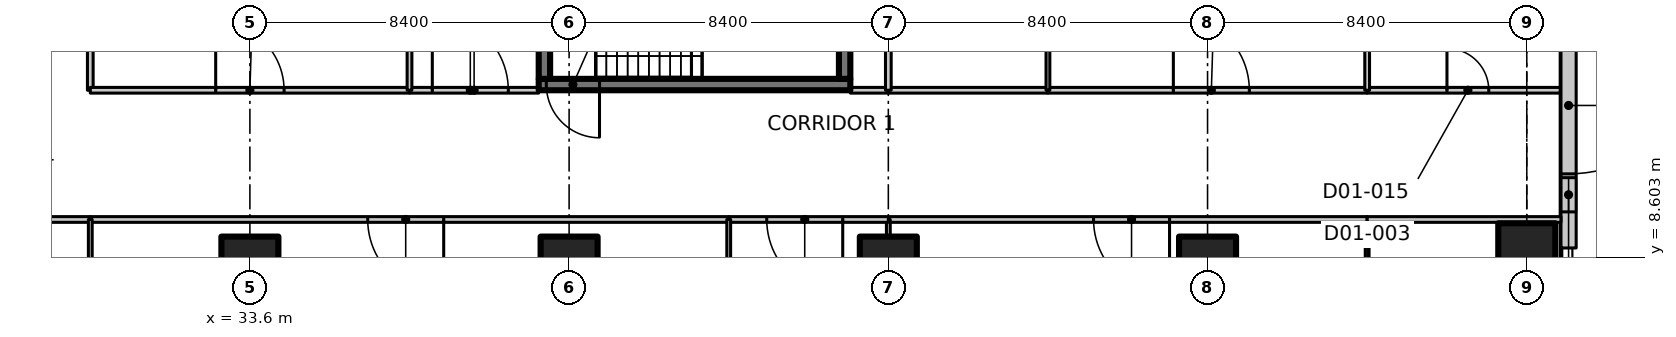
"""IFC4 building model, lengths in metres.
Left out: names, types, materials, properties, quantities, classifications, styles, units other than length and angle.
Written with IfcOpenShell. Run it as: python <this file> out.ifc"""

import sys

from ifc_helpers import new_model, si_unit, direction, frame, frame_2d, origin, origin_2d, place, context, subcontext, project, spatial, polyline, rectangle, outline, extrude, element, fill, save


model = new_model("IFC4")
c1 = context("Model", 3, precision=1e-05, world=origin(), true_north=direction((0.0, 1.0)))
c2 = subcontext(c1, "Body", "Model", "MODEL_VIEW")
j1 = project(units=[si_unit("LENGTHUNIT", "METRE"), si_unit("PLANEANGLEUNIT", "RADIAN")], contexts=[c1])
p1 = place(None, origin())
s1 = spatial("IfcSite", under=j1, at=p1, CompositionType="ELEMENT")
p2 = place(p1, origin())
s2 = spatial("IfcBuilding", under=s1, at=p2, CompositionType="ELEMENT")
p3 = place(p2, origin())
s3 = spatial("IfcBuildingStorey", under=s2, at=p3, CompositionType="ELEMENT", Elevation=0.0)
for number, where, z_axis, x_axis in (
    (1, (33.6, 8.4, 0.0), (0.0, 0.0, 1.0), (1.0, 0.0, 0.0)),
    (2, (42.0, 8.4, 0.0), (0.0, 0.0, 1.0), (1.0, 0.0, 0.0)),
    (3, (50.4, 8.4, 0.0), (0.0, 0.0, 1.0), (1.0, 0.0, 0.0)),
    (4, (58.8, 8.4, 0.0), (0.0, 0.0, 1.0), (1.0, 0.0, 0.0)),
):
    element("IfcColumn", number, at=place(p3, frame(where, z_axis=z_axis, x_axis=x_axis)), inside=s3, PredefinedType="COLUMN", context=c2, shape_type="SweptSolid", body=[
        extrude(rectangle(XDim=1.5, YDim=1.5, at=origin_2d()), origin(), (0.0, 0.0, 1.0), 6.75),
    ])
p4 = place(p3, frame((67.2, 8.4, 0.0), z_axis=(0.0, 0.0, 1.0), x_axis=(1.0, 0.0, 0.0)))
e5 = element("IfcColumn", 5, at=p4, inside=s3, PredefinedType="COLUMN", context=c2, shape_type="SweptSolid", body=[
    extrude(rectangle(XDim=1.5, YDim=2.2, at=origin_2d()), origin(), (0.0, 0.0, 1.0), 6.75),
])
p5 = place(p3, frame((68.3, 16.35, 0.0), z_axis=(0.0, 0.0, 1.0), x_axis=(0.0, -1.0, 0.0)))
e6 = element("IfcWall", 6, at=p5, inside=s3, PredefinedType="SOLIDWALL", context=c2, shape_type="SweptSolid", body=[
    extrude(rectangle(XDim=7.5, YDim=0.4, at=frame_2d((3.75, 0.0))), origin(), (0.0, 0.0, 1.0), 6.75),
])
p6 = place(p5, frame((1.95, 0.0, 0.0)))
e7 = element("IfcOpeningElement", 7, at=p6, cuts=e6, PredefinedType="OPENING", context=c2, shape_type="SweptSolid", body=[
    extrude(rectangle(XDim=3.6, YDim=2.8, at=frame_2d((1.8, 1.4))), frame((0.0, 0.21, 0.0), z_axis=(0.0, -1.0, 0.0), x_axis=(1.0, 0.0, 0.0)), (0.0, 0.0, 1.0), 0.42),
])
p7 = place(p5, frame((0.95, 0.0, 0.0)))
e8 = element("IfcOpeningElement", 8, at=p7, cuts=e6, PredefinedType="OPENING", context=c2, shape_type="SweptSolid", body=[
    extrude(rectangle(XDim=0.9, YDim=2.8, at=frame_2d((0.45, 1.4))), frame((0.0, 0.21, 0.0), z_axis=(0.0, -1.0, 0.0), x_axis=(1.0, 0.0, 0.0)), (0.0, 0.0, 1.0), 0.42),
])
p8 = place(p5, frame((5.65, 0.0, 0.0)))
e9 = element("IfcOpeningElement", 9, at=p8, cuts=e6, PredefinedType="OPENING", context=c2, shape_type="SweptSolid", body=[
    extrude(rectangle(XDim=0.9, YDim=2.8, at=frame_2d((0.45, 1.4))), frame((0.0, 0.21, 0.0), z_axis=(0.0, -1.0, 0.0), x_axis=(1.0, 0.0, 0.0)), (0.0, 0.0, 1.0), 0.42),
])
p9 = place(p3, frame((49.4, 13.15, 0.0), z_axis=(0.0, 0.0, 1.0), x_axis=(-1.0, 0.0, 0.0)))
e10 = element("IfcWall", 10, at=p9, inside=s3, PredefinedType="SHEAR", context=c2, shape_type="SweptSolid", body=[
    extrude(rectangle(XDim=8.2, YDim=0.3, at=frame_2d((4.1, 0.0))), origin(), (0.0, 0.0, 1.0), 6.75),
])
p10 = place(p9, frame((6.6, 0.0, 0.0)))
e11 = element("IfcOpeningElement", 11, at=p10, cuts=e10, PredefinedType="OPENING", context=c2, shape_type="SweptSolid", body=[
    extrude(rectangle(XDim=1.4, YDim=2.1, at=frame_2d((0.7, 1.05))), frame((0.0, 0.16, 0.0), z_axis=(0.0, -1.0, 0.0), x_axis=(1.0, 0.0, 0.0)), (0.0, 0.0, 1.0), 0.32),
])
for number, where, z_axis, x_axis in (
    (12, (41.35, 13.3, 0.0), (0.0, 0.0, 1.0), (0.0, 1.0, 0.0)),
    (13, (49.25, 13.3, 0.0), (0.0, 0.0, 1.0), (0.0, 1.0, 0.0)),
):
    element("IfcWall", number, at=place(p3, frame(where, z_axis=z_axis, x_axis=x_axis)), inside=s3, PredefinedType="SHEAR", context=c2, shape_type="SweptSolid", body=[
        extrude(rectangle(XDim=2.55, YDim=0.3, at=frame_2d((1.275, 0.0))), origin(), (0.0, 0.0, 1.0), 6.75),
    ])
p11 = place(p3, frame((29.4, 9.6, 0.0), z_axis=(0.0, 0.0, 1.0), x_axis=(-1.0, 0.0, 0.0)))
e14 = element("IfcWall", 14, at=p11, inside=s3, PredefinedType="PARTITIONING", context=c2, shape_type="SweptSolid", body=[
    extrude(rectangle(XDim=4.2, YDim=0.15, at=frame_2d((2.1, 0.0))), origin(), (0.0, 0.0, 1.0), 6.73),
])
p12 = place(p11, frame((1.5, 0.0, 0.0)))
e15 = element("IfcOpeningElement", 15, at=p12, cuts=e14, PredefinedType="OPENING", context=c2, shape_type="SweptSolid", body=[
    extrude(rectangle(XDim=1.1, YDim=2.1, at=frame_2d((0.55, 1.05))), frame((0.0, 0.085, 0.0), z_axis=(0.0, -1.0, 0.0), x_axis=(1.0, 0.0, 0.0)), (0.0, 0.0, 1.0), 0.17),
])
p13 = place(p3, frame((29.4, 21.2, 0.0), z_axis=(0.0, 0.0, 1.0), x_axis=(0.0, -1.0, 0.0)))
e16 = element("IfcWall", 16, at=p13, inside=s3, PredefinedType="PARTITIONING", context=c2, shape_type="SweptSolid", body=[
    extrude(rectangle(XDim=8.2, YDim=0.15, at=frame_2d((4.1, 0.0))), origin(), (0.0, 0.0, 1.0), 6.73),
])
p14 = place(p3, frame((63.0, 9.6, 0.0), z_axis=(0.0, 0.0, 1.0), x_axis=(0.0, -1.0, 0.0)))
e17 = element("IfcWall", 17, at=p14, inside=s3, PredefinedType="PARTITIONING", context=c2, shape_type="SweptSolid", body=[
    extrude(outline(polyline([(0.0, 0.0), (5.4, 0.0), (5.4, 6.38), (4.736, 6.38), (4.734, 6.73), (0.0, 6.73), (0.0, 0.0)])), frame((0.0, 0.05, 0.0), z_axis=(0.0, -1.0, 0.0), x_axis=(1.0, 0.0, 0.0)), (0.0, 0.0, 1.0), 0.1),
])
p15 = place(p14, frame((2.1, 0.0, 0.0)))
e18 = element("IfcOpeningElement", 18, at=p15, cuts=e17, PredefinedType="OPENING", context=c2, shape_type="SweptSolid", body=[
    extrude(rectangle(XDim=1.0, YDim=2.1, at=frame_2d((0.5, 1.05))), frame((0.0, 0.06, 0.0), z_axis=(0.0, -1.0, 0.0), x_axis=(1.0, 0.0, 0.0)), (0.0, 0.0, 1.0), 0.12),
])
p16 = place(p3, frame((63.0, 9.6, 0.0), z_axis=(0.0, 0.0, 1.0), x_axis=(-1.0, 0.0, 0.0)))
e19 = element("IfcWall", 19, at=p16, inside=s3, PredefinedType="PARTITIONING", context=c2, shape_type="SweptSolid", body=[
    extrude(rectangle(XDim=12.6, YDim=0.15, at=frame_2d((6.3, 0.0))), origin(), (0.0, 0.0, 1.0), 6.73),
])
p17 = place(p16, frame((5.2, 0.0, 0.0)))
e20 = element("IfcOpeningElement", 20, at=p17, cuts=e19, PredefinedType="OPENING", context=c2, shape_type="SweptSolid", body=[
    extrude(rectangle(XDim=2.0, YDim=2.4, at=frame_2d((1.0, 1.2))), frame((0.0, 0.085, 0.0), z_axis=(0.0, -1.0, 0.0), x_axis=(1.0, 0.0, 0.0)), (0.0, 0.0, 1.0), 0.17),
])
p18 = place(p3, frame((50.4, 9.17, 0.0), z_axis=(0.0, 0.0, 1.0), x_axis=(0.0, 1.0, 0.0)))
e21 = element("IfcWall", 21, at=p18, inside=s3, PredefinedType="PARTITIONING", context=c2, shape_type="SweptSolid", body=[
    extrude(rectangle(XDim=0.43, YDim=0.1, at=frame_2d((0.215, 0.0))), origin(), (0.0, 0.0, 1.0), 6.73),
])
p19 = place(p3, frame((63.0, 9.6, 0.0), z_axis=(0.0, 0.0, 1.0), x_axis=(1.0, 0.0, 0.0)))
e22 = element("IfcWall", 22, at=p19, inside=s3, PredefinedType="PARTITIONING", context=c2, shape_type="SweptSolid", body=[
    extrude(outline(polyline([(0.0, 0.0), (5.1, 0.0), (5.1, 6.73), (4.65, 6.73), (4.648, 6.38), (3.752, 6.38), (3.75, 6.73), (0.0, 6.73), (0.0, 0.0)])), frame((0.0, 0.075, 0.0), z_axis=(0.0, -1.0, 0.0), x_axis=(1.0, 0.0, 0.0)), (0.0, 0.0, 1.0), 0.15),
])
p20 = place(p3, frame((46.2, 9.6, 0.0), z_axis=(0.0, 0.0, 1.0), x_axis=(-1.0, 0.0, 0.0)))
e23 = element("IfcWall", 23, at=p20, inside=s3, PredefinedType="PARTITIONING", context=c2, shape_type="SweptSolid", body=[
    extrude(rectangle(XDim=16.8, YDim=0.15, at=frame_2d((8.4, 0.0))), origin(), (0.0, 0.0, 1.0), 6.73),
])
p21 = place(p20, frame((7.5, 0.0, 0.0)))
e24 = element("IfcOpeningElement", 24, at=p21, cuts=e23, PredefinedType="OPENING", context=c2, shape_type="SweptSolid", body=[
    extrude(rectangle(XDim=2.0, YDim=2.4, at=frame_2d((1.0, 1.2))), frame((0.0, 0.085, 0.0), z_axis=(0.0, -1.0, 0.0), x_axis=(1.0, 0.0, 0.0)), (0.0, 0.0, 1.0), 0.17),
])
p22 = place(p3, frame((50.4, 9.6, 0.0), z_axis=(0.0, 0.0, 1.0), x_axis=(-1.0, 0.0, 0.0)))
e25 = element("IfcWall", 25, at=p22, inside=s3, PredefinedType="PARTITIONING", context=c2, shape_type="SweptSolid", body=[
    extrude(rectangle(XDim=4.2, YDim=0.15, at=frame_2d((2.1, 0.0))), origin(), (0.0, 0.0, 1.0), 6.73),
])
p23 = place(p22, frame((1.2, 0.0, 0.0)))
e26 = element("IfcOpeningElement", 26, at=p23, cuts=e25, PredefinedType="OPENING", context=c2, shape_type="SweptSolid", body=[
    extrude(rectangle(XDim=2.0, YDim=2.4, at=frame_2d((1.0, 1.2))), frame((0.0, 0.085, 0.0), z_axis=(0.0, -1.0, 0.0), x_axis=(1.0, 0.0, 0.0)), (0.0, 0.0, 1.0), 0.17),
])
p24 = place(p3, frame((29.4, 13.0, 0.0), z_axis=(0.0, 0.0, 1.0), x_axis=(1.0, 0.0, 0.0)))
e27 = element("IfcWall", 27, at=p24, inside=s3, PredefinedType="PARTITIONING", context=c2, shape_type="SweptSolid", body=[
    extrude(rectangle(XDim=8.4, YDim=0.15, at=frame_2d((4.2, 0.0))), origin(), (0.0, 0.0, 1.0), 6.73),
])
p25 = place(p24, frame((3.3, 0.0, 0.0)))
e28 = element("IfcOpeningElement", 28, at=p25, cuts=e27, PredefinedType="OPENING", context=c2, shape_type="SweptSolid", body=[
    extrude(rectangle(XDim=1.8, YDim=2.1, at=frame_2d((0.9, 1.05))), frame((0.0, 0.085, 0.0), z_axis=(0.0, -1.0, 0.0), x_axis=(1.0, 0.0, 0.0)), (0.0, 0.0, 1.0), 0.17),
])
p26 = place(p3, frame((37.8, 13.0, 0.0), z_axis=(0.0, 0.0, 1.0), x_axis=(1.0, 0.0, 0.0)))
e29 = element("IfcWall", 29, at=p26, inside=s3, PredefinedType="PARTITIONING", context=c2, shape_type="SweptSolid", body=[
    extrude(rectangle(XDim=3.4, YDim=0.15, at=frame_2d((1.7, 0.0))), origin(), (0.0, 0.0, 1.0), 6.73),
])
p27 = place(p26, frame((0.6, 0.0, 0.0)))
e30 = element("IfcOpeningElement", 30, at=p27, cuts=e29, PredefinedType="OPENING", context=c2, shape_type="SweptSolid", body=[
    extrude(rectangle(XDim=2.0, YDim=2.4, at=frame_2d((1.0, 1.2))), frame((0.0, 0.085, 0.0), z_axis=(0.0, -1.0, 0.0), x_axis=(1.0, 0.0, 0.0)), (0.0, 0.0, 1.0), 0.17),
])
p28 = place(p3, frame((49.4, 13.0, 0.0), z_axis=(0.0, 0.0, 1.0), x_axis=(1.0, 0.0, 0.0)))
e31 = element("IfcWall", 31, at=p28, inside=s3, PredefinedType="PARTITIONING", context=c2, shape_type="SweptSolid", body=[
    extrude(rectangle(XDim=1.0, YDim=0.15, at=frame_2d((0.5, 0.0))), origin(), (0.0, 0.0, 1.0), 6.73),
])
p29 = place(p3, frame((54.6, 13.0, 0.0), z_axis=(0.0, 0.0, 1.0), x_axis=(1.0, 0.0, 0.0)))
e32 = element("IfcWall", 32, at=p29, inside=s3, PredefinedType="PARTITIONING", context=c2, shape_type="SweptSolid", body=[
    extrude(rectangle(XDim=8.4, YDim=0.15, at=frame_2d((4.2, 0.0))), origin(), (0.0, 0.0, 1.0), 6.73),
])
p30 = place(p29, frame((3.3, 0.0, 0.0)))
e33 = element("IfcOpeningElement", 33, at=p30, cuts=e32, PredefinedType="OPENING", context=c2, shape_type="SweptSolid", body=[
    extrude(rectangle(XDim=2.0, YDim=2.4, at=frame_2d((1.0, 1.2))), frame((0.0, 0.085, 0.0), z_axis=(0.0, -1.0, 0.0), x_axis=(1.0, 0.0, 0.0)), (0.0, 0.0, 1.0), 0.17),
])
p31 = place(p3, frame((50.4, 13.0, 0.0), z_axis=(0.0, 0.0, 1.0), x_axis=(1.0, 0.0, 0.0)))
e34 = element("IfcWall", 34, at=p31, inside=s3, PredefinedType="PARTITIONING", context=c2, shape_type="SweptSolid", body=[
    extrude(rectangle(XDim=4.2, YDim=0.15, at=frame_2d((2.1, 0.0))), origin(), (0.0, 0.0, 1.0), 6.73),
])
p32 = place(p3, frame((63.0, 13.0, 0.0), z_axis=(0.0, 0.0, 1.0), x_axis=(1.0, 0.0, 0.0)))
e35 = element("IfcWall", 35, at=p32, inside=s3, PredefinedType="PARTITIONING", context=c2, shape_type="SweptSolid", body=[
    extrude(outline(polyline([(0.0, 0.0), (5.08, 0.0), (5.08, 6.73), (4.65, 6.73), (4.648, 6.38), (3.752, 6.38), (3.75, 6.73), (0.0, 6.73), (0.0, 0.0)])), frame((0.0, 0.075, 0.0), z_axis=(0.0, -1.0, 0.0), x_axis=(1.0, 0.0, 0.0)), (0.0, 0.0, 1.0), 0.15),
])
p33 = place(p32, frame((2.1, 0.0, 0.0)))
e36 = element("IfcOpeningElement", 36, at=p33, cuts=e35, PredefinedType="OPENING", context=c2, shape_type="SweptSolid", body=[
    extrude(rectangle(XDim=1.1, YDim=2.1, at=frame_2d((0.55, 1.05))), frame((0.0, 0.085, 0.0), z_axis=(0.0, -1.0, 0.0), x_axis=(1.0, 0.0, 0.0)), (0.0, 0.0, 1.0), 0.17),
])
for number, where, z_axis, x_axis in (
    (37, (29.4, 9.6, 0.0), (0.0, 0.0, 1.0), (0.0, -1.0, 0.0)),
    (38, (46.2, 9.6, 0.0), (0.0, 0.0, 1.0), (0.0, -1.0, 0.0)),
):
    element("IfcWall", number, at=place(p3, frame(where, z_axis=z_axis, x_axis=x_axis)), inside=s3, PredefinedType="PARTITIONING", context=c2, shape_type="SweptSolid", body=[
        extrude(outline(polyline([(0.0, 0.0), (10.7, 0.0), (10.7, 6.73), (10.05, 6.73), (10.048, 6.38), (9.152, 6.38), (9.15, 6.73), (0.0, 6.73), (0.0, 0.0)])), frame((0.0, 0.05, 0.0), z_axis=(0.0, -1.0, 0.0), x_axis=(1.0, 0.0, 0.0)), (0.0, 0.0, 1.0), 0.1),
    ])
p34 = place(p3, frame((37.8, 30.243, 0.0), z_axis=(0.0, 0.0, 1.0), x_axis=(0.0, -1.0, 0.0)))
e39 = element("IfcWall", 39, at=p34, inside=s3, PredefinedType="PARTITIONING", context=c2, shape_type="SweptSolid", body=[
    extrude(outline(polyline([(0.0, 0.0), (17.243, 0.0), (17.243, 6.73), (5.493, 6.73), (5.491, 6.38), (4.595, 6.38), (4.593, 6.73), (0.0, 6.73), (0.0, 0.0)])), frame((0.0, 0.062, 0.0), z_axis=(0.0, -1.0, 0.0), x_axis=(1.0, 0.0, 0.0)), (0.0, 0.0, 1.0), 0.125),
])
p35 = place(p3, frame((50.4, 16.03, 0.0), z_axis=(0.0, 0.0, 1.0), x_axis=(0.0, -1.0, 0.0)))
e40 = element("IfcWall", 40, at=p35, inside=s3, PredefinedType="PARTITIONING", context=c2, shape_type="SweptSolid", body=[
    extrude(rectangle(XDim=3.03, YDim=0.15, at=frame_2d((1.515, 0.0))), origin(), (0.0, 0.0, 1.0), 6.73),
])
p36 = place(p3, frame((54.6, 13.0, 0.0), z_axis=(0.0, 0.0, 1.0), x_axis=(0.0, 1.0, 0.0)))
e41 = element("IfcWall", 41, at=p36, inside=s3, PredefinedType="PARTITIONING", context=c2, shape_type="SweptSolid", body=[
    extrude(rectangle(XDim=8.4, YDim=0.1, at=frame_2d((4.2, 0.0))), origin(), (0.0, 0.0, 1.0), 6.73),
])
p37 = place(p36, frame((3.6, 0.0, 0.0)))
e42 = element("IfcOpeningElement", 42, at=p37, cuts=e41, PredefinedType="OPENING", context=c2, shape_type="SweptSolid", body=[
    extrude(rectangle(XDim=1.0, YDim=2.1, at=frame_2d((0.5, 1.05))), frame((0.0, 0.06, 0.0), z_axis=(0.0, -1.0, 0.0), x_axis=(1.0, 0.0, 0.0)), (0.0, 0.0, 1.0), 0.12),
])
p38 = place(p3, frame((63.0, 25.4, 0.0), z_axis=(0.0, 0.0, 1.0), x_axis=(0.0, -1.0, 0.0)))
e43 = element("IfcWall", 43, at=p38, inside=s3, PredefinedType="PARTITIONING", context=c2, shape_type="SweptSolid", body=[
    extrude(outline(polyline([(0.0, 0.0), (12.4, 0.0), (12.4, 6.73), (5.078, 6.73), (5.076, 6.38), (3.724, 6.38), (3.722, 6.73), (0.0, 6.73), (0.0, 0.0)])), frame((0.0, 0.062, 0.0), z_axis=(0.0, -1.0, 0.0), x_axis=(1.0, 0.0, 0.0)), (0.0, 0.0, 1.0), 0.125),
])
p39 = place(p6, origin())
e44 = element("IfcDoor", 44, at=p39, inside=s3, OperationType="DOUBLE_DOOR_DOUBLE_SWING", PredefinedType="DOOR", context=c2, shape_type="SweptSolid", body=[
    extrude(rectangle(XDim=3.6, YDim=2.8, at=frame_2d((1.8, 1.4))), frame((0.0, 0.025, 0.0), z_axis=(0.0, -1.0, 0.0), x_axis=(1.0, 0.0, 0.0)), (0.0, 0.0, 1.0), 0.05),
])
fill(e7, e44)
p40 = place(p8, origin())
e45 = element("IfcWindow", 45, at=p40, inside=s3, PartitioningType="SINGLE_PANEL", PredefinedType="WINDOW", context=c2, shape_type="SweptSolid", body=[
    extrude(rectangle(XDim=0.9, YDim=2.8, at=frame_2d((0.45, 1.4))), frame((0.0, 0.03, 0.0), z_axis=(0.0, -1.0, 0.0), x_axis=(1.0, 0.0, 0.0)), (0.0, 0.0, 1.0), 0.06),
])
fill(e9, e45)
p41 = place(p10, origin())
e46 = element("IfcDoor", 46, at=p41, inside=s3, OperationType="SINGLE_SWING_LEFT", PredefinedType="DOOR", context=c2, shape_type="SweptSolid", body=[
    extrude(rectangle(XDim=1.4, YDim=2.1, at=frame_2d((0.7, 1.05))), frame((0.0, 0.025, 0.0), z_axis=(0.0, -1.0, 0.0), x_axis=(1.0, 0.0, 0.0)), (0.0, 0.0, 1.0), 0.05),
])
fill(e11, e46)
p42 = place(p17, origin())
e47 = element("IfcDoor", 47, at=p42, inside=s3, OperationType="DOUBLE_DOOR_SINGLE_SWING", PredefinedType="DOOR", context=c2, shape_type="SweptSolid", body=[
    extrude(rectangle(XDim=2.0, YDim=2.4, at=frame_2d((1.0, 1.2))), frame((0.0, 0.025, 0.0), z_axis=(0.0, -1.0, 0.0), x_axis=(1.0, 0.0, 0.0)), (0.0, 0.0, 1.0), 0.05),
])
fill(e20, e47)
p43 = place(p21, origin())
e48 = element("IfcDoor", 48, at=p43, inside=s3, OperationType="DOUBLE_DOOR_SINGLE_SWING", PredefinedType="DOOR", context=c2, shape_type="SweptSolid", body=[
    extrude(rectangle(XDim=2.0, YDim=2.4, at=frame_2d((1.0, 1.2))), frame((0.0, 0.025, 0.0), z_axis=(0.0, -1.0, 0.0), x_axis=(1.0, 0.0, 0.0)), (0.0, 0.0, 1.0), 0.05),
])
fill(e24, e48)
p44 = place(p23, origin())
e49 = element("IfcDoor", 49, at=p44, inside=s3, OperationType="DOUBLE_DOOR_SINGLE_SWING", PredefinedType="DOOR", context=c2, shape_type="SweptSolid", body=[
    extrude(rectangle(XDim=2.0, YDim=2.4, at=frame_2d((1.0, 1.2))), frame((0.0, 0.025, 0.0), z_axis=(0.0, -1.0, 0.0), x_axis=(1.0, 0.0, 0.0)), (0.0, 0.0, 1.0), 0.05),
])
fill(e26, e49)
p45 = place(p25, origin())
e50 = element("IfcDoor", 50, at=p45, inside=s3, OperationType="DOUBLE_DOOR_SINGLE_SWING", PredefinedType="DOOR", context=c2, shape_type="SweptSolid", body=[
    extrude(rectangle(XDim=1.8, YDim=2.1, at=frame_2d((0.9, 1.05))), frame((0.0, 0.025, 0.0), z_axis=(0.0, -1.0, 0.0), x_axis=(1.0, 0.0, 0.0)), (0.0, 0.0, 1.0), 0.05),
])
fill(e28, e50)
p46 = place(p27, origin())
e51 = element("IfcDoor", 51, at=p46, inside=s3, OperationType="DOUBLE_DOOR_SINGLE_SWING", PredefinedType="DOOR", context=c2, shape_type="SweptSolid", body=[
    extrude(rectangle(XDim=2.0, YDim=2.4, at=frame_2d((1.0, 1.2))), frame((0.0, 0.025, 0.0), z_axis=(0.0, -1.0, 0.0), x_axis=(1.0, 0.0, 0.0)), (0.0, 0.0, 1.0), 0.05),
])
fill(e30, e51)
p47 = place(p30, origin())
e52 = element("IfcDoor", 52, at=p47, inside=s3, OperationType="DOUBLE_DOOR_SINGLE_SWING", PredefinedType="DOOR", context=c2, shape_type="SweptSolid", body=[
    extrude(rectangle(XDim=2.0, YDim=2.4, at=frame_2d((1.0, 1.2))), frame((0.0, 0.025, 0.0), z_axis=(0.0, -1.0, 0.0), x_axis=(1.0, 0.0, 0.0)), (0.0, 0.0, 1.0), 0.05),
])
fill(e33, e52)
p48 = place(p33, origin())
e53 = element("IfcDoor", 53, at=p48, inside=s3, OperationType="SINGLE_SWING_LEFT", PredefinedType="DOOR", context=c2, shape_type="SweptSolid", body=[
    extrude(rectangle(XDim=1.1, YDim=2.1, at=frame_2d((0.55, 1.05))), frame((0.0, 0.025, 0.0), z_axis=(0.0, -1.0, 0.0), x_axis=(1.0, 0.0, 0.0)), (0.0, 0.0, 1.0), 0.05),
])
fill(e36, e53)
save(model, sys.argv[1])
